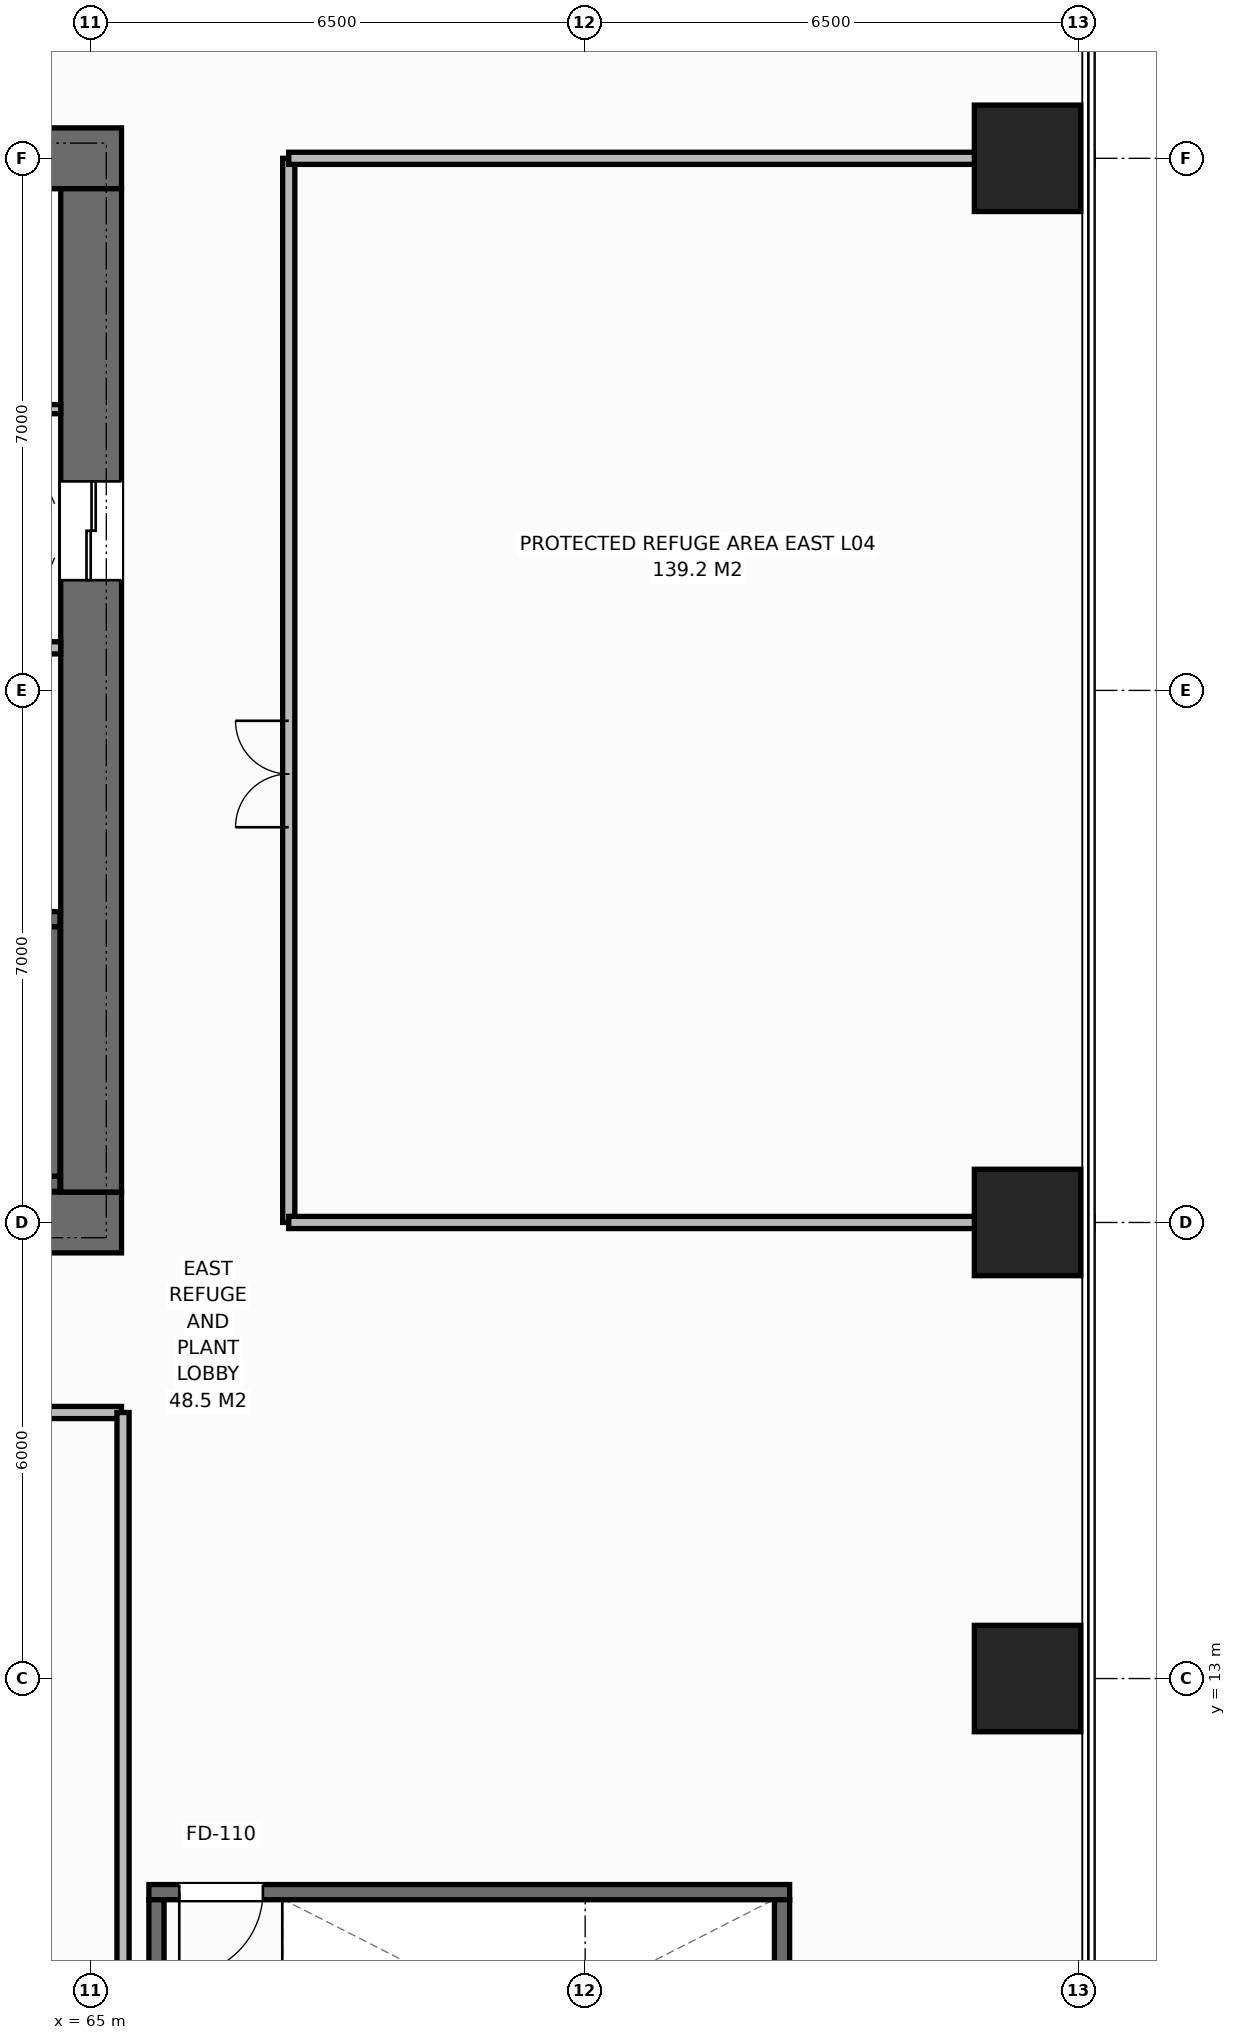
"""IFC4 building model, lengths in metres.
Left out: names, types, materials, properties, quantities, classifications, styles, units other than length and angle.
Written with IfcOpenShell. Run it as: python <this file> out.ifc"""

import sys

from ifc_helpers import new_model, si_unit, direction, frame, frame_2d, origin, origin_2d, place, context, subcontext, project, spatial, rectangle, extrude, element, fill, save


model = new_model("IFC4")
c1 = context("Model", 3, precision=1e-05, world=origin(), true_north=direction((0.0, 1.0)))
c2 = subcontext(c1, "Body", "Model", "MODEL_VIEW")
j1 = project(units=[si_unit("LENGTHUNIT", "METRE"), si_unit("PLANEANGLEUNIT", "RADIAN")], contexts=[c1])
p1 = place(None, origin())
s1 = spatial("IfcSite", under=j1, at=p1, CompositionType="ELEMENT")
p2 = place(p1, origin())
s2 = spatial("IfcBuilding", under=s1, at=p2, CompositionType="ELEMENT")
p3 = place(p2, frame((0.0, 0.0, 22.0)))
s3 = spatial("IfcBuildingStorey", under=s2, at=p3, CompositionType="ELEMENT", Elevation=22.0)
p4 = place(p3, frame((51.6, 19.0, 0.0), z_axis=(0.0, 0.0, 1.0), x_axis=(1.0, 0.0, 0.0)))
e1 = element("IfcWall", 1, at=p4, inside=s3, PredefinedType="SHEAR", context=c2, shape_type="SweptSolid", body=[
    extrude(rectangle(XDim=13.8, YDim=0.8, at=frame_2d((6.9, 0.0))), origin(), (0.0, 0.0, 1.0), 5.8),
])
p5 = place(p4, frame((3.12, 0.0, 0.0)))
e2 = element("IfcOpeningElement", 2, at=p5, cuts=e1, PredefinedType="OPENING", context=c2, shape_type="SweptSolid", body=[
    extrude(rectangle(XDim=1.4, YDim=2.2, at=frame_2d((0.7, 1.1))), frame((0.0, 0.41, 0.0), z_axis=(0.0, -1.0, 0.0), x_axis=(1.0, 0.0, 0.0)), (0.0, 0.0, 1.0), 0.82),
])
p6 = place(p3, frame((51.6, 33.0, 0.0), z_axis=(0.0, 0.0, 1.0), x_axis=(1.0, 0.0, 0.0)))
e3 = element("IfcWall", 3, at=p6, inside=s3, PredefinedType="SHEAR", context=c2, shape_type="SweptSolid", body=[
    extrude(rectangle(XDim=13.8, YDim=0.8, at=frame_2d((6.9, 0.0))), origin(), (0.0, 0.0, 1.0), 5.8),
])
p7 = place(p6, frame((3.12, 0.0, 0.0)))
e4 = element("IfcOpeningElement", 4, at=p7, cuts=e3, PredefinedType="OPENING", context=c2, shape_type="SweptSolid", body=[
    extrude(rectangle(XDim=1.4, YDim=2.2, at=frame_2d((0.7, 1.1))), frame((0.0, 0.41, 0.0), z_axis=(0.0, -1.0, 0.0), x_axis=(1.0, 0.0, 0.0)), (0.0, 0.0, 1.0), 0.82),
])
p8 = place(p6, frame((11.0, 0.0, 0.0)))
e5 = element("IfcOpeningElement", 5, at=p8, cuts=e3, PredefinedType="OPENING", context=c2, shape_type="SweptSolid", body=[
    extrude(rectangle(XDim=0.9, YDim=2.15, at=frame_2d((0.45, 1.075))), frame((0.0, 0.41, 0.0), z_axis=(0.0, -1.0, 0.0), x_axis=(1.0, 0.0, 0.0)), (0.0, 0.0, 1.0), 0.82),
])
p9 = place(p6, frame((6.4, 0.0, 0.0)))
e6 = element("IfcOpeningElement", 6, at=p9, cuts=e3, PredefinedType="OPENING", context=c2, shape_type="SweptSolid", body=[
    extrude(rectangle(XDim=0.95, YDim=2.15, at=frame_2d((0.475, 1.075))), frame((0.0, 0.41, 0.0), z_axis=(0.0, -1.0, 0.0), x_axis=(1.0, 0.0, 0.0)), (0.0, 0.0, 1.0), 0.82),
])
p10 = place(p6, frame((8.85, 0.0, 0.0)))
e7 = element("IfcOpeningElement", 7, at=p10, cuts=e3, PredefinedType="OPENING", context=c2, shape_type="SweptSolid", body=[
    extrude(rectangle(XDim=0.9, YDim=2.15, at=frame_2d((0.45, 1.075))), frame((0.0, 0.41, 0.0), z_axis=(0.0, -1.0, 0.0), x_axis=(1.0, 0.0, 0.0)), (0.0, 0.0, 1.0), 0.82),
])
p11 = place(p3, frame((65.0, 19.4, 0.0), z_axis=(0.0, 0.0, 1.0), x_axis=(0.0, 1.0, 0.0)))
e8 = element("IfcWall", 8, at=p11, inside=s3, PredefinedType="SHEAR", context=c2, shape_type="SweptSolid", body=[
    extrude(rectangle(XDim=13.2, YDim=0.8, at=frame_2d((6.6, 0.0))), origin(), (0.0, 0.0, 1.0), 5.8),
])
p12 = place(p11, frame((8.05, 0.0, 0.0)))
e9 = element("IfcOpeningElement", 9, at=p12, cuts=e8, PredefinedType="OPENING", context=c2, shape_type="SweptSolid", body=[
    extrude(rectangle(XDim=1.3, YDim=2.2, at=frame_2d((0.65, 1.1))), frame((0.0, 0.41, 0.0), z_axis=(0.0, -1.0, 0.0), x_axis=(1.0, 0.0, 0.0)), (0.0, 0.0, 1.0), 0.82),
])
p13 = place(p3, frame((56.16, 19.51, 0.0), z_axis=(0.0, 0.0, 1.0), x_axis=(1.0, 0.0, 0.0)))
e10 = element("IfcWall", 10, at=p13, inside=s3, PredefinedType="SHEAR", context=c2, shape_type="SweptSolid", body=[
    extrude(rectangle(XDim=8.43, YDim=0.2, at=frame_2d((4.215, 0.0))), origin(), (0.0, 0.0, 1.0), 5.8),
])
p14 = place(p3, frame((56.16, 22.99, 0.0), z_axis=(0.0, 0.0, 1.0), x_axis=(1.0, 0.0, 0.0)))
e11 = element("IfcWall", 11, at=p14, inside=s3, PredefinedType="SHEAR", context=c2, shape_type="SweptSolid", body=[
    extrude(rectangle(XDim=8.43, YDim=0.2, at=frame_2d((4.215, 0.0))), origin(), (0.0, 0.0, 1.0), 5.8),
])
p15 = place(p14, frame((0.45, 0.0, 0.0)))
e12 = element("IfcOpeningElement", 12, at=p15, cuts=e11, PredefinedType="OPENING", context=c2, shape_type="SweptSolid", body=[
    extrude(rectangle(XDim=1.0, YDim=2.15, at=frame_2d((0.5, 1.075))), frame((0.0, 0.11, 0.0), z_axis=(0.0, -1.0, 0.0), x_axis=(1.0, 0.0, 0.0)), (0.0, 0.0, 1.0), 0.22),
])
p16 = place(p3, frame((64.49, 19.61, 0.0), z_axis=(0.0, 0.0, 1.0), x_axis=(0.0, 1.0, 0.0)))
e13 = element("IfcWall", 13, at=p16, inside=s3, PredefinedType="SHEAR", context=c2, shape_type="SweptSolid", body=[
    extrude(rectangle(XDim=3.28, YDim=0.2, at=frame_2d((1.64, 0.0))), origin(), (0.0, 0.0, 1.0), 5.8),
])
p17 = place(p3, frame((65.76, 10.19, 0.0), z_axis=(0.0, 0.0, 1.0), x_axis=(1.0, 0.0, 0.0)))
e14 = element("IfcWall", 14, at=p17, inside=s3, PredefinedType="SHEAR", context=c2, shape_type="SweptSolid", body=[
    extrude(rectangle(XDim=8.43, YDim=0.2, at=frame_2d((4.215, 0.0))), origin(), (0.0, 0.0, 1.0), 5.55),
])
p18 = place(p17, frame((0.4, 0.0, 0.0)))
e15 = element("IfcOpeningElement", 15, at=p18, cuts=e14, PredefinedType="OPENING", context=c2, shape_type="SweptSolid", body=[
    extrude(rectangle(XDim=1.1, YDim=2.15, at=frame_2d((0.55, 1.075))), frame((0.0, 0.11, 0.0), z_axis=(0.0, -1.0, 0.0), x_axis=(1.0, 0.0, 0.0)), (0.0, 0.0, 1.0), 0.22),
])
for number, where, z_axis, x_axis in (
    (16, (65.86, 6.81, 0.0), (0.0, 0.0, 1.0), (0.0, 1.0, 0.0)),
    (17, (74.09, 6.81, 0.0), (0.0, 0.0, 1.0), (0.0, 1.0, 0.0)),
):
    element("IfcWall", number, at=place(p3, frame(where, z_axis=z_axis, x_axis=x_axis)), inside=s3, PredefinedType="SHEAR", context=c2, shape_type="SweptSolid", body=[
        extrude(rectangle(XDim=3.28, YDim=0.2, at=frame_2d((1.64, 0.0))), origin(), (0.0, 0.0, 1.0), 5.55),
    ])
for number, where, z_axis, x_axis in (
    (18, (77.32, 13.0, 0.0), (0.0, 0.0, 1.0), (1.0, 0.0, 0.0)),
    (19, (77.32, 19.0, 0.0), (0.0, 0.0, 1.0), (1.0, 0.0, 0.0)),
    (20, (77.32, 33.0, 0.0), (0.0, 0.0, 1.0), (1.0, 0.0, 0.0)),
):
    element("IfcColumn", number, at=place(p3, frame(where, z_axis=z_axis, x_axis=x_axis)), inside=s3, PredefinedType="COLUMN", context=c2, shape_type="SweptSolid", body=[
        extrude(rectangle(XDim=1.4, YDim=1.4, at=origin_2d()), origin(), (0.0, 0.0, 1.0), 5.8),
    ])
p19 = place(p3, frame((56.26, 26.56, 0.0), z_axis=(0.0, 0.0, 1.0), x_axis=(1.0, 0.0, 0.0)))
e21 = element("IfcWall", 21, at=p19, inside=s3, PredefinedType="STANDARD", context=c2, shape_type="SweptSolid", body=[
    extrude(rectangle(XDim=8.34, YDim=0.16, at=frame_2d((4.17, 0.0))), origin(), (0.0, 0.0, 1.0), 5.55),
])
p20 = place(p3, frame((61.87, 29.7, 0.0), z_axis=(0.0, 0.0, 1.0), x_axis=(1.0, 0.0, 0.0)))
e22 = element("IfcWall", 22, at=p20, inside=s3, PredefinedType="PARTITIONING", context=c2, shape_type="SweptSolid", body=[
    extrude(rectangle(XDim=2.73, YDim=0.12, at=frame_2d((1.365, 0.0))), origin(), (0.0, 0.0, 1.0), 5.55),
])
p21 = place(p3, frame((67.6, 19.0, 0.0), z_axis=(0.0, 0.0, 1.0), x_axis=(0.0, 1.0, 0.0)))
e23 = element("IfcWall", 23, at=p21, inside=s3, PredefinedType="STANDARD", context=c2, shape_type="SweptSolid", body=[
    extrude(rectangle(XDim=14.0, YDim=0.16, at=frame_2d((7.0, 0.0))), origin(), (0.0, 0.0, 1.0), 5.55),
])
p22 = place(p21, frame((5.2, 0.0, 0.0)))
e24 = element("IfcOpeningElement", 24, at=p22, cuts=e23, PredefinedType="OPENING", context=c2, shape_type="SweptSolid", body=[
    extrude(rectangle(XDim=1.4, YDim=2.2, at=frame_2d((0.7, 1.1))), frame((0.0, 0.09, 0.0), z_axis=(0.0, -1.0, 0.0), x_axis=(1.0, 0.0, 0.0)), (0.0, 0.0, 1.0), 0.18),
])
for number, where, z_axis, x_axis in (
    (25, (67.6, 19.0, 0.0), (0.0, 0.0, 1.0), (1.0, 0.0, 0.0)),
    (26, (67.6, 33.0, 0.0), (0.0, 0.0, 1.0), (1.0, 0.0, 0.0)),
):
    element("IfcWall", number, at=place(p3, frame(where, z_axis=z_axis, x_axis=x_axis)), inside=s3, PredefinedType="STANDARD", context=c2, shape_type="SweptSolid", body=[
        extrude(rectangle(XDim=10.58, YDim=0.16, at=frame_2d((5.29, 0.0))), origin(), (0.0, 0.0, 1.0), 4.9),
    ])
p23 = place(p3, frame((44.466, 16.5, 0.0), z_axis=(0.0, 0.0, 1.0), x_axis=(1.0, 0.0, 0.0)))
e27 = element("IfcWall", 27, at=p23, inside=s3, PredefinedType="STANDARD", context=c2, shape_type="SweptSolid", body=[
    extrude(rectangle(XDim=20.934, YDim=0.16, at=frame_2d((10.467, 0.0))), origin(), (0.0, 0.0, 1.0), 5.55),
])
p24 = place(p23, frame((9.414, 0.0, 0.0)))
e28 = element("IfcOpeningElement", 28, at=p24, cuts=e27, PredefinedType="OPENING", context=c2, shape_type="SweptSolid", body=[
    extrude(rectangle(XDim=1.4, YDim=2.2, at=frame_2d((0.7, 1.1))), frame((0.0, 0.09, 0.0), z_axis=(0.0, -1.0, 0.0), x_axis=(1.0, 0.0, 0.0)), (0.0, 0.0, 1.0), 0.18),
])
p25 = place(p3, frame((65.42, 1.09, 0.0), z_axis=(0.0, 0.0, 1.0), x_axis=(0.0, 1.0, 0.0)))
e29 = element("IfcWall", 29, at=p25, inside=s3, PredefinedType="STANDARD", context=c2, shape_type="SweptSolid", body=[
    extrude(rectangle(XDim=15.41, YDim=0.16, at=frame_2d((7.705, 0.0))), origin(), (0.0, 0.0, 1.0), 5.55),
])
p26 = place(p12, origin())
e30 = element("IfcDoor", 30, at=p26, inside=s3, OperationType="DOUBLE_DOOR_SLIDING", PredefinedType="DOOR", context=c2, shape_type="SweptSolid", body=[
    extrude(rectangle(XDim=1.3, YDim=2.2, at=frame_2d((0.65, 1.1))), frame((0.0, 0.025, 0.0), z_axis=(0.0, -1.0, 0.0), x_axis=(1.0, 0.0, 0.0)), (0.0, 0.0, 1.0), 0.05),
])
fill(e9, e30)
p27 = place(p18, origin())
e31 = element("IfcDoor", 31, at=p27, inside=s3, OperationType="SINGLE_SWING_RIGHT", PredefinedType="DOOR", context=c2, shape_type="SweptSolid", body=[
    extrude(rectangle(XDim=1.1, YDim=2.15, at=frame_2d((0.55, 1.075))), frame((0.0, 0.025, 0.0), z_axis=(0.0, -1.0, 0.0), x_axis=(1.0, 0.0, 0.0)), (0.0, 0.0, 1.0), 0.05),
])
fill(e15, e31)
p28 = place(p22, origin())
e32 = element("IfcDoor", 32, at=p28, inside=s3, OperationType="DOUBLE_DOOR_SINGLE_SWING", PredefinedType="DOOR", context=c2, shape_type="SweptSolid", body=[
    extrude(rectangle(XDim=1.4, YDim=2.2, at=frame_2d((0.7, 1.1))), frame((0.0, 0.025, 0.0), z_axis=(0.0, -1.0, 0.0), x_axis=(1.0, 0.0, 0.0)), (0.0, 0.0, 1.0), 0.05),
])
fill(e24, e32)
save(model, sys.argv[1])
